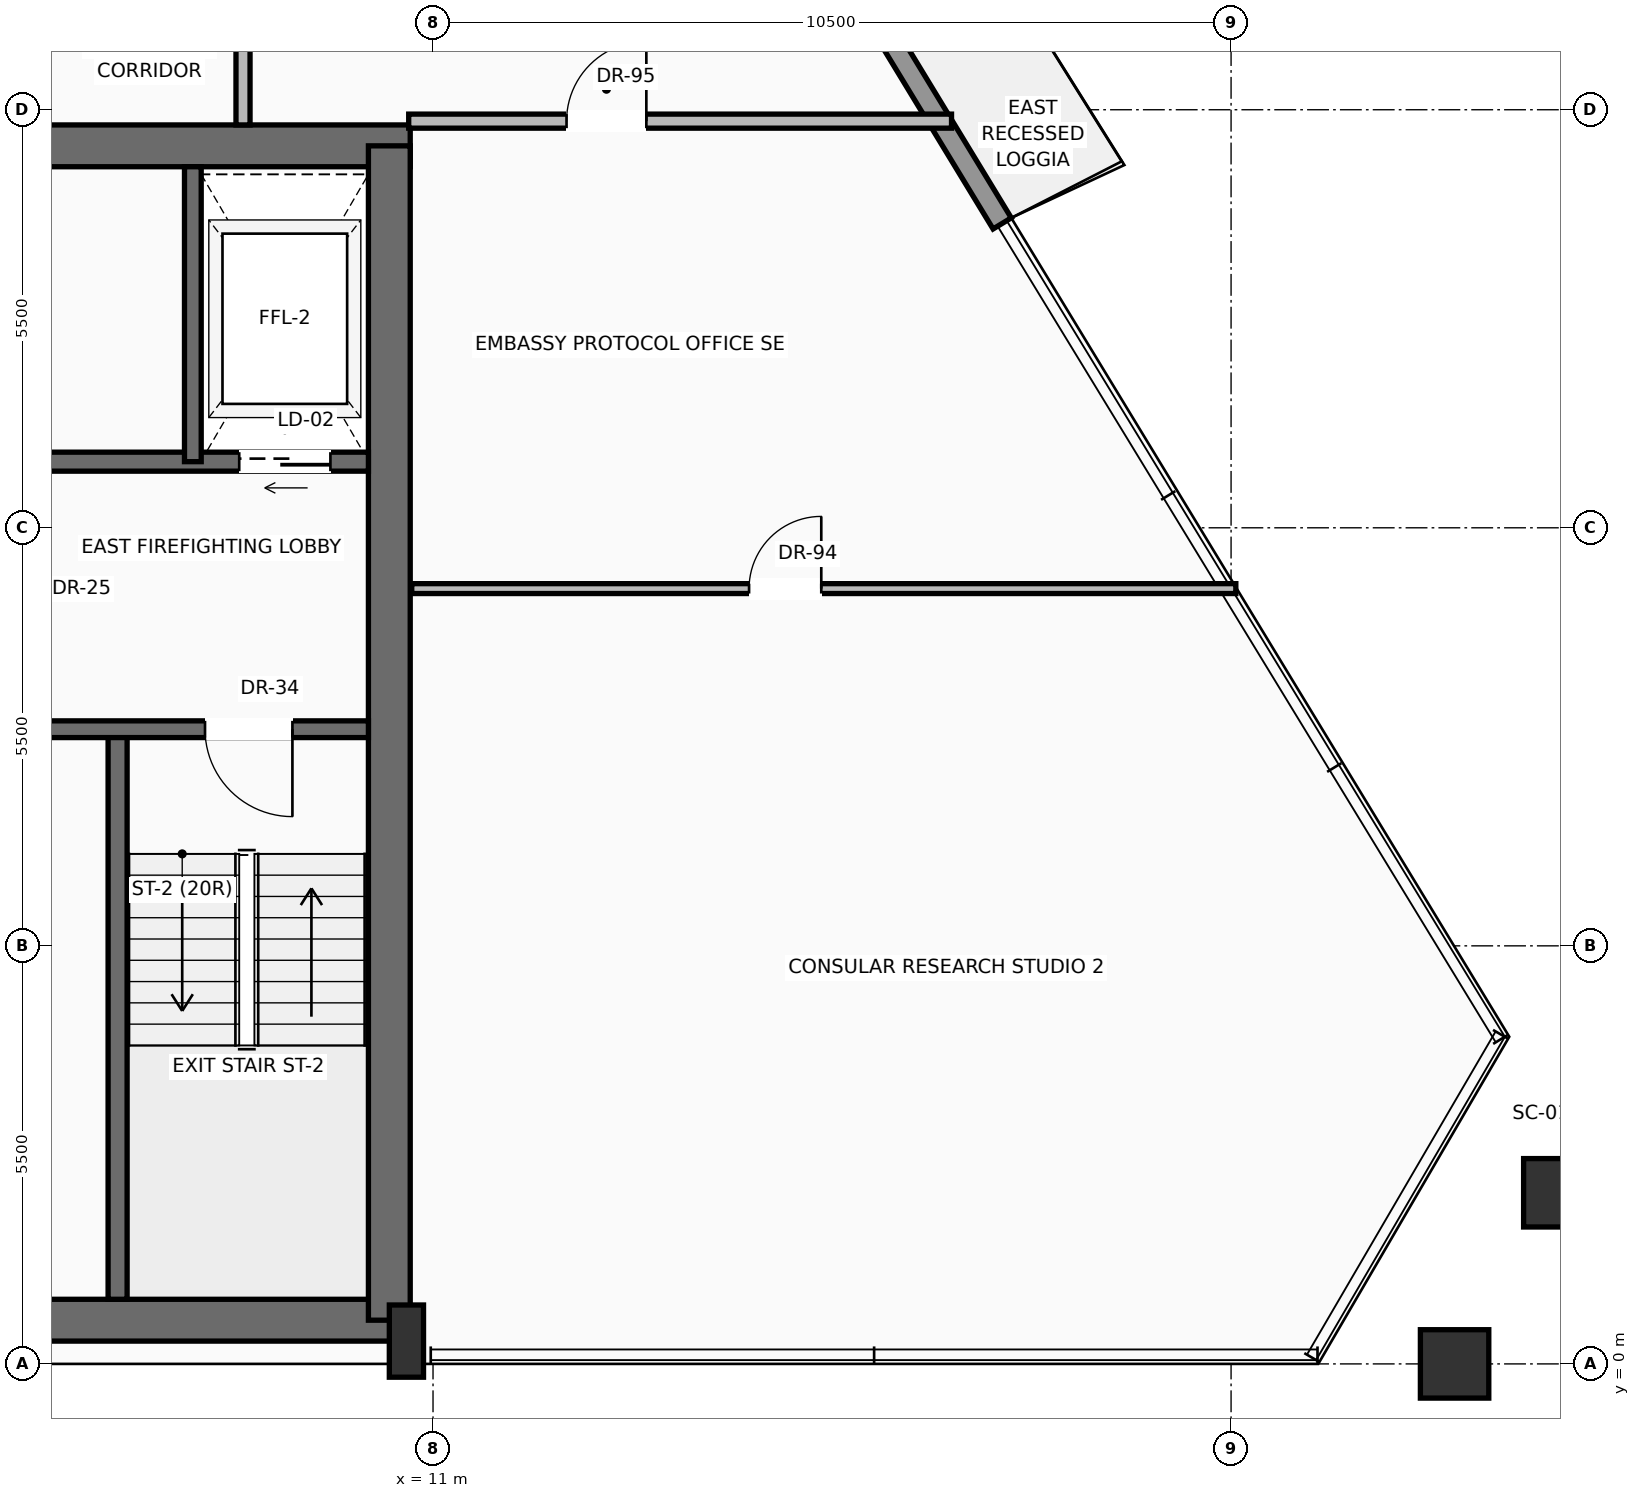
"""IFC4 building model, lengths in metres.
Left out: names, types, materials, properties, quantities, classifications, styles, units other than length and angle.
Written with IfcOpenShell. Run it as: python <this file> out.ifc"""

import sys

from ifc_helpers import new_model, si_unit, direction, frame, frame_2d, origin, origin_2d, place, context, subcontext, project, spatial, rectangle, hollow_rectangle, extrude, source, transform, mapped, element, fill, save


model = new_model("IFC4")
c1 = context("Model", 3, precision=1e-05, world=origin(), true_north=direction((0.0, 1.0)))
c2 = subcontext(c1, "Body", "Model", "MODEL_VIEW")
j1 = project(units=[si_unit("LENGTHUNIT", "METRE"), si_unit("PLANEANGLEUNIT", "RADIAN")], contexts=[c1])
p1 = place(None, origin())
s1 = spatial("IfcSite", under=j1, at=p1, CompositionType="ELEMENT")
p2 = place(p1, origin())
s2 = spatial("IfcBuilding", under=s1, at=p2, CompositionType="ELEMENT")
p3 = place(p2, frame((0.0, 0.0, 254.5)))
s3 = spatial("IfcBuildingStorey", under=s2, at=p3, CompositionType="ELEMENT", Elevation=254.5)
p4 = place(p3, frame((-10.65, 0.575, 0.0), z_axis=(0.0, 0.0, 1.0), x_axis=(1.0, 0.0, 0.0)))
e1 = element("IfcWall", 1, at=p4, inside=s3, PredefinedType="SHEAR", context=c2, shape_type="SweptSolid", body=[
    extrude(rectangle(XDim=21.3, YDim=0.55, at=frame_2d((10.65, 0.0))), origin(), (0.0, 0.0, 1.0), 3.15),
])
p5 = place(p3, frame((-10.7, 16.025, 0.0), z_axis=(0.0, 0.0, 1.0), x_axis=(1.0, 0.0, 0.0)))
e2 = element("IfcWall", 2, at=p5, inside=s3, PredefinedType="SHEAR", context=c2, shape_type="SweptSolid", body=[
    extrude(rectangle(XDim=21.4, YDim=0.55, at=frame_2d((10.7, 0.0))), origin(), (0.0, 0.0, 1.0), 3.15),
])
p6 = place(p5, frame((3.27, 0.0, 0.0)))
e3 = element("IfcOpeningElement", 3, at=p6, cuts=e2, PredefinedType="OPENING", context=c2, shape_type="SweptSolid", body=[
    extrude(rectangle(XDim=1.3, YDim=2.3, at=frame_2d((0.65, 1.15))), frame((0.0, 0.285, 0.0), z_axis=(0.0, -1.0, 0.0), x_axis=(1.0, 0.0, 0.0)), (0.0, 0.0, 1.0), 0.57),
])
p7 = place(p5, frame((9.7, 0.0, 0.0)))
e4 = element("IfcOpeningElement", 4, at=p7, cuts=e2, PredefinedType="OPENING", context=c2, shape_type="SweptSolid", body=[
    extrude(rectangle(XDim=2.0, YDim=2.4, at=frame_2d((1.0, 1.2))), frame((0.0, 0.285, 0.0), z_axis=(0.0, -1.0, 0.0), x_axis=(1.0, 0.0, 0.0)), (0.0, 0.0, 1.0), 0.57),
])
p8 = place(p3, frame((10.425, 0.575, 0.0), z_axis=(0.0, 0.0, 1.0), x_axis=(0.0, 1.0, 0.0)))
e5 = element("IfcWall", 5, at=p8, inside=s3, PredefinedType="SHEAR", context=c2, shape_type="SweptSolid", body=[
    extrude(rectangle(XDim=15.45, YDim=0.55, at=frame_2d((7.725, 0.0))), origin(), (0.0, 0.0, 1.0), 3.15),
])
m1 = source(origin(), c2, "Body", "SweptSolid", [
    extrude(rectangle(XDim=0.45, YDim=0.95, at=origin_2d()), origin(), (0.0, 0.0, 1.0), 3.45),
])
p9 = place(p3, frame((10.65, 0.3, 0.0), z_axis=(0.0, 0.0, 1.0), x_axis=(1.0, 0.0, 0.0)))
e6 = element("IfcColumn", 6, at=p9, inside=s3, PredefinedType="PILASTER", context=c2, shape_type="MappedRepresentation", body=[
    mapped(m1, transform((0.0, 0.0, 0.0), scale=1.0)),
])
m2 = source(origin(), c2, "Body", "SweptSolid", [
    extrude(hollow_rectangle(XDim=0.9, YDim=0.9, WallThickness=0.045, at=origin_2d()), origin(), (0.0, 0.0, 1.0), 3.441),
])
p10 = place(p3, frame((24.441, 0.0, 0.004), z_axis=(-0.000496629949, 0.0, 0.999999876679), x_axis=(1.0, 0.0, 0.0)))
e7 = element("IfcColumn", 7, at=p10, inside=s3, PredefinedType="COLUMN", context=c2, shape_type="MappedRepresentation", body=[
    mapped(m2, transform((0.0, 0.0, 0.0), scale=1.0)),
])
m3 = source(origin(), c2, "Body", "SweptSolid", [
    extrude(hollow_rectangle(XDim=0.9, YDim=0.9, WallThickness=0.045, at=origin_2d()), origin(), (0.0, 0.0, 1.0), 3.442),
])
p11 = place(p3, frame((25.799, 2.251, 0.004), z_axis=(-0.010781953224, -0.016031062031, 0.99981335985), x_axis=(0.829783939239, -0.558084773293, 0.0)))
e8 = element("IfcColumn", 8, at=p11, inside=s3, PredefinedType="COLUMN", context=c2, shape_type="MappedRepresentation", body=[
    mapped(m3, transform((0.0, 0.0, 0.0), scale=1.0)),
])
p12 = place(p3, frame((8.192, 31.933, 0.0), z_axis=(0.0, 0.0, 1.0), x_axis=(0.51964514921, -0.854382185502, 0.0)))
e9 = element("IfcWall", 9, at=p12, inside=s3, PredefinedType="SOLIDWALL", context=c2, shape_type="SweptSolid", body=[
    extrude(rectangle(XDim=19.814, YDim=0.28, at=frame_2d((9.907, 0.0))), origin(), (0.0, 0.0, 1.0), 2.73),
])
p13 = place(p12, frame((4.755, 0.0, 0.0)))
e10 = element("IfcOpeningElement", 10, at=p13, cuts=e9, PredefinedType="OPENING", context=c2, shape_type="SweptSolid", body=[
    extrude(rectangle(XDim=1.6, YDim=2.35, at=frame_2d((0.8, 1.175))), frame((0.0, 0.15, 0.0), z_axis=(0.0, -1.0, 0.0), x_axis=(1.0, 0.0, 0.0)), (0.0, 0.0, 1.0), 0.3),
])
p14 = place(p3, frame((6.85, 0.85, 0.0), z_axis=(0.0, 0.0, 1.0), x_axis=(0.0, 1.0, 0.0)))
e11 = element("IfcWall", 11, at=p14, inside=s3, PredefinedType="SOLIDWALL", context=c2, shape_type="SweptSolid", body=[
    extrude(rectangle(XDim=7.5, YDim=0.25, at=frame_2d((3.75, 0.0))), origin(), (0.0, 0.0, 1.0), 3.15),
])
p15 = place(p3, frame((10.15, 8.35, 0.0), z_axis=(0.0, 0.0, 1.0), x_axis=(-1.0, 0.0, 0.0)))
e12 = element("IfcWall", 12, at=p15, inside=s3, PredefinedType="SOLIDWALL", context=c2, shape_type="SweptSolid", body=[
    extrude(rectangle(XDim=4.65, YDim=0.22, at=frame_2d((2.325, 0.0))), origin(), (0.0, 0.0, 1.0), 3.15),
])
p16 = place(p15, frame((1.0, 0.0, 0.0)))
e13 = element("IfcOpeningElement", 13, at=p16, cuts=e12, PredefinedType="OPENING", context=c2, shape_type="SweptSolid", body=[
    extrude(rectangle(XDim=1.15, YDim=2.2, at=frame_2d((0.575, 1.1))), frame((0.0, 0.12, 0.0), z_axis=(0.0, -1.0, 0.0), x_axis=(1.0, 0.0, 0.0)), (0.0, 0.0, 1.0), 0.24),
])
p17 = place(p3, frame((10.15, 11.87, 0.0), z_axis=(0.0, 0.0, 1.0), x_axis=(-1.0, 0.0, 0.0)))
e14 = element("IfcWall", 14, at=p17, inside=s3, PredefinedType="SOLIDWALL", context=c2, shape_type="SweptSolid", body=[
    extrude(rectangle(XDim=4.65, YDim=0.25, at=frame_2d((2.325, 0.0))), origin(), (0.0, 0.0, 1.0), 3.15),
])
p18 = place(p17, frame((0.5, 0.0, 0.0)))
e15 = element("IfcOpeningElement", 15, at=p18, cuts=e14, PredefinedType="OPENING", context=c2, shape_type="SweptSolid", body=[
    extrude(rectangle(XDim=1.2, YDim=2.25, at=frame_2d((0.6, 1.125))), frame((0.0, 0.135, 0.0), z_axis=(0.0, -1.0, 0.0), x_axis=(1.0, 0.0, 0.0)), (0.0, 0.0, 1.0), 0.27),
])
p19 = place(p3, frame((7.84, 11.87, 0.0), z_axis=(0.0, 0.0, 1.0), x_axis=(0.0, 1.0, 0.0)))
e16 = element("IfcWall", 16, at=p19, inside=s3, PredefinedType="SOLIDWALL", context=c2, shape_type="SweptSolid", body=[
    extrude(rectangle(XDim=3.88, YDim=0.22, at=frame_2d((1.94, 0.0))), origin(), (0.0, 0.0, 1.0), 3.15),
])
p20 = place(p3, frame((8.5, 16.3, 0.0), z_axis=(0.0, 0.0, 1.0), x_axis=(0.0, 1.0, 0.0)))
e17 = element("IfcWall", 17, at=p20, inside=s3, PredefinedType="PARTITIONING", context=c2, shape_type="SweptSolid", body=[
    extrude(rectangle(XDim=12.1, YDim=0.185, at=frame_2d((6.05, 0.0))), origin(), (0.0, 0.0, 1.0), 3.142),
])
p21 = place(p20, frame((2.882, 0.0, 0.0)))
e18 = element("IfcOpeningElement", 18, at=p21, cuts=e17, PredefinedType="OPENING", context=c2, shape_type="SweptSolid", body=[
    extrude(rectangle(XDim=1.05, YDim=2.25, at=frame_2d((0.525, 1.125))), frame((0.0, 0.103, 0.0), z_axis=(0.0, -1.0, 0.0), x_axis=(1.0, 0.0, 0.0)), (0.0, 0.0, 1.0), 0.205),
])
p22 = place(p20, frame((6.552, 0.0, 0.0)))
e19 = element("IfcOpeningElement", 19, at=p22, cuts=e17, PredefinedType="OPENING", context=c2, shape_type="SweptSolid", body=[
    extrude(rectangle(XDim=1.05, YDim=2.25, at=frame_2d((0.525, 1.125))), frame((0.0, 0.103, 0.0), z_axis=(0.0, -1.0, 0.0), x_axis=(1.0, 0.0, 0.0)), (0.0, 0.0, 1.0), 0.205),
])
p23 = place(p20, frame((9.865, 0.0, 0.0)))
e20 = element("IfcOpeningElement", 20, at=p23, cuts=e17, PredefinedType="OPENING", context=c2, shape_type="SweptSolid", body=[
    extrude(rectangle(XDim=1.05, YDim=2.25, at=frame_2d((0.525, 1.125))), frame((0.0, 0.103, 0.0), z_axis=(0.0, -1.0, 0.0), x_axis=(1.0, 0.0, 0.0)), (0.0, 0.0, 1.0), 0.205),
])
p24 = place(p3, frame((10.68, 16.35, 0.0), z_axis=(0.0, 0.0, 1.0), x_axis=(1.0, 0.0, 0.0)))
e21 = element("IfcWall", 21, at=p24, inside=s3, PredefinedType="PARTITIONING", context=c2, shape_type="SweptSolid", body=[
    extrude(rectangle(XDim=7.142, YDim=0.185, at=frame_2d((3.571, 0.0))), origin(), (0.0, 0.0, 1.0), 3.142),
])
p25 = place(p24, frame((2.077, 0.0, 0.0)))
e22 = element("IfcOpeningElement", 22, at=p25, cuts=e21, PredefinedType="OPENING", context=c2, shape_type="SweptSolid", body=[
    extrude(rectangle(XDim=1.05, YDim=2.25, at=frame_2d((0.525, 1.125))), frame((0.0, 0.103, 0.0), z_axis=(0.0, -1.0, 0.0), x_axis=(1.0, 0.0, 0.0)), (0.0, 0.0, 1.0), 0.205),
])
p26 = place(p3, frame((10.72, 10.2, 0.0), z_axis=(0.0, 0.0, 1.0), x_axis=(1.0, 0.0, 0.0)))
e23 = element("IfcWall", 23, at=p26, inside=s3, PredefinedType="PARTITIONING", context=c2, shape_type="SweptSolid", body=[
    extrude(rectangle(XDim=10.843, YDim=0.13, at=frame_2d((5.421, 0.0))), origin(), (0.0, 0.0, 1.0), 3.142),
])
p27 = place(p26, frame((4.438, 0.0, 0.0)))
e24 = element("IfcOpeningElement", 24, at=p27, cuts=e23, PredefinedType="OPENING", context=c2, shape_type="SweptSolid", body=[
    extrude(rectangle(XDim=0.95, YDim=2.2, at=frame_2d((0.475, 1.1))), frame((0.0, 0.075, 0.0), z_axis=(0.0, -1.0, 0.0), x_axis=(1.0, 0.0, 0.0)), (0.0, 0.0, 1.0), 0.15),
])
m4 = source(origin(), c2, "Body", "SweptSolid", [
    extrude(rectangle(XDim=1.15, YDim=2.2, at=frame_2d((0.575, 1.1))), frame((0.0, 0.025, 0.0), z_axis=(0.0, -1.0, 0.0), x_axis=(1.0, 0.0, 0.0)), (0.0, 0.0, 1.0), 0.05),
])
p28 = place(p16, origin())
e25 = element("IfcDoor", 25, at=p28, inside=s3, OperationType="SINGLE_SWING_LEFT", PredefinedType="DOOR", context=c2, shape_type="MappedRepresentation", body=[
    mapped(m4, transform((0.0, 0.0, 0.0), scale=1.0)),
])
fill(e13, e25)
m5 = source(origin(), c2, "Body", "SweptSolid", [
    extrude(rectangle(XDim=1.2, YDim=2.25, at=frame_2d((0.6, 1.125))), frame((0.0, 0.025, 0.0), z_axis=(0.0, -1.0, 0.0), x_axis=(1.0, 0.0, 0.0)), (0.0, 0.0, 1.0), 0.05),
])
p29 = place(p18, origin())
e26 = element("IfcDoor", 26, at=p29, inside=s3, OperationType="SLIDING_TO_RIGHT", PredefinedType="DOOR", context=c2, shape_type="MappedRepresentation", body=[
    mapped(m5, transform((0.0, 0.0, 0.0), scale=1.0)),
])
fill(e15, e26)
m6 = source(origin(), c2, "Body", "SweptSolid", [
    extrude(rectangle(XDim=1.05, YDim=2.25, at=frame_2d((0.525, 1.125))), frame((0.0, 0.025, 0.0), z_axis=(0.0, -1.0, 0.0), x_axis=(1.0, 0.0, 0.0)), (0.0, 0.0, 1.0), 0.05),
])
p30 = place(p25, origin())
e27 = element("IfcDoor", 27, at=p30, inside=s3, OperationType="SINGLE_SWING_RIGHT", PredefinedType="DOOR", context=c2, shape_type="MappedRepresentation", body=[
    mapped(m6, transform((0.0, 0.0, 0.0), scale=1.0)),
])
fill(e22, e27)
m7 = source(origin(), c2, "Body", "SweptSolid", [
    extrude(rectangle(XDim=0.95, YDim=2.2, at=frame_2d((0.475, 1.1))), frame((0.0, 0.025, 0.0), z_axis=(0.0, -1.0, 0.0), x_axis=(1.0, 0.0, 0.0)), (0.0, 0.0, 1.0), 0.05),
])
p31 = place(p27, origin())
e28 = element("IfcDoor", 28, at=p31, inside=s3, OperationType="SINGLE_SWING_RIGHT", PredefinedType="DOOR", context=c2, shape_type="MappedRepresentation", body=[
    mapped(m7, transform((0.0, 0.0, 0.0), scale=1.0)),
])
fill(e24, e28)
save(model, sys.argv[1])
